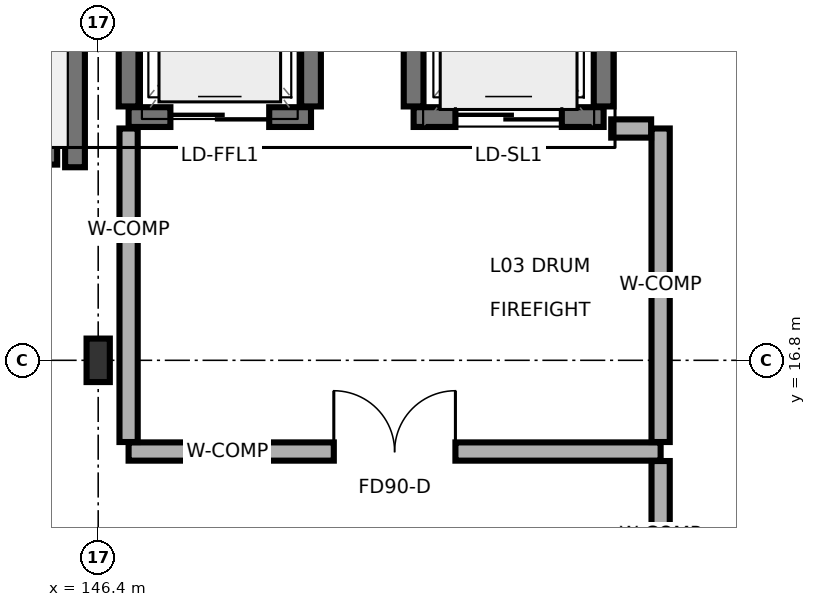
"""IFC4 building model, lengths in metres.
Left out: names, types, materials, properties, quantities, classifications, styles, units other than length and angle.
Written with IfcOpenShell. Run it as: python <this file> out.ifc"""

import sys

from ifc_helpers import new_model, si_unit, direction, frame, frame_2d, origin, origin_2d, place, context, subcontext, project, spatial, rectangle, i_section, extrude, element, fill, save


model = new_model("IFC4")
c1 = context("Model", 3, precision=1e-05, world=origin(), true_north=direction((0.0, 1.0)))
c2 = subcontext(c1, "Body", "Model", "MODEL_VIEW")
j1 = project(units=[si_unit("LENGTHUNIT", "METRE"), si_unit("PLANEANGLEUNIT", "RADIAN")], contexts=[c1])
p1 = place(None, origin())
s1 = spatial("IfcSite", under=j1, at=p1, CompositionType="ELEMENT")
p2 = place(p1, origin())
s2 = spatial("IfcBuilding", under=s1, at=p2, CompositionType="ELEMENT")
p3 = place(p2, frame((0.0, 0.0, 9.9)))
s3 = spatial("IfcBuildingStorey", under=s2, at=p3, CompositionType="ELEMENT", Elevation=9.9)
p4 = place(p3, frame((146.4, 16.8, 0.0), z_axis=(0.0, 0.0, 1.0), x_axis=(1.0, 0.0, 0.0)))
e1 = element("IfcColumn", 1, at=p4, inside=s3, PredefinedType="COLUMN", context=c2, shape_type="SweptSolid", body=[
    extrude(i_section(OverallWidth=0.306, OverallDepth=0.572, WebThickness=0.021, FlangeThickness=0.04, FilletRadius=0.027, at=origin_2d()), origin(), (0.0, 0.0, 1.0), 4.8),
])
p5 = place(p3, frame((146.095, 19.34, 0.0), z_axis=(0.0, 0.0, 1.0), x_axis=(0.0, 1.0, 0.0)))
e2 = element("IfcWall", 2, at=p5, inside=s3, PredefinedType="SHEAR", context=c2, shape_type="SweptSolid", body=[
    extrude(rectangle(XDim=4.27, YDim=0.26, at=frame_2d((2.135, 0.0))), origin(), (0.0, 0.0, 1.0), 3.535),
])
p6 = place(p3, frame((137.34, 19.505, 0.0), z_axis=(0.0, 0.0, 1.0), x_axis=(1.0, 0.0, 0.0)))
e3 = element("IfcWall", 3, at=p6, inside=s3, PredefinedType="SHEAR", context=c2, shape_type="SweptSolid", body=[
    extrude(rectangle(XDim=8.52, YDim=0.26, at=frame_2d((4.26, 0.0))), origin(), (0.0, 0.0, 1.0), 3.535),
])
p7 = place(p3, frame((146.8, 20.0, 0.0), z_axis=(0.0, 0.0, 1.0), x_axis=(1.0, 0.0, 0.0)))
e4 = element("IfcWall", 4, at=p7, inside=s3, PredefinedType="SHEAR", context=c2, shape_type="SweptSolid", body=[
    extrude(rectangle(XDim=2.4, YDim=0.26, at=frame_2d((1.2, 0.0))), origin(), (0.0, 0.0, 1.0), 4.54),
])
p8 = place(p7, frame((0.55, 0.0, 0.0)))
e5 = element("IfcOpeningElement", 5, at=p8, cuts=e4, PredefinedType="OPENING", context=c2, shape_type="SweptSolid", body=[
    extrude(rectangle(XDim=1.3, YDim=2.25, at=frame_2d((0.65, 1.125))), frame((0.0, 0.14, 0.0), z_axis=(0.0, -1.0, 0.0), x_axis=(1.0, 0.0, 0.0)), (0.0, 0.0, 1.0), 0.28),
])
for number, where, z_axis, x_axis in (
    (6, (146.8, 20.14, 0.0), (0.0, 0.0, 1.0), (0.0, 1.0, 0.0)),
    (7, (149.2, 20.14, 0.0), (0.0, 0.0, 1.0), (0.0, 1.0, 0.0)),
):
    element("IfcWall", number, at=place(p3, frame(where, z_axis=z_axis, x_axis=x_axis)), inside=s3, PredefinedType="SHEAR", context=c2, shape_type="SweptSolid", body=[
        extrude(rectangle(XDim=2.52, YDim=0.26, at=frame_2d((1.26, 0.0))), origin(), (0.0, 0.0, 1.0), 4.54),
    ])
p9 = place(p3, frame((150.55, 20.0, 0.0), z_axis=(0.0, 0.0, 1.0), x_axis=(1.0, 0.0, 0.0)))
e8 = element("IfcWall", 8, at=p9, inside=s3, PredefinedType="SHEAR", context=c2, shape_type="SweptSolid", body=[
    extrude(rectangle(XDim=2.5, YDim=0.26, at=frame_2d((1.25, 0.0))), origin(), (0.0, 0.0, 1.0), 4.54),
])
p10 = place(p9, frame((0.55, 0.0, 0.0)))
e9 = element("IfcOpeningElement", 9, at=p10, cuts=e8, PredefinedType="OPENING", context=c2, shape_type="SweptSolid", body=[
    extrude(rectangle(XDim=1.4, YDim=2.3, at=frame_2d((0.7, 1.15))), frame((0.0, 0.14, 0.0), z_axis=(0.0, -1.0, 0.0), x_axis=(1.0, 0.0, 0.0)), (0.0, 0.0, 1.0), 0.28),
])
for number, where, z_axis, x_axis in (
    (10, (150.55, 20.14, 0.0), (0.0, 0.0, 1.0), (0.0, 1.0, 0.0)),
    (11, (153.05, 20.14, 0.0), (0.0, 0.0, 1.0), (0.0, 1.0, 0.0)),
):
    element("IfcWall", number, at=place(p3, frame(where, z_axis=z_axis, x_axis=x_axis)), inside=s3, PredefinedType="SHEAR", context=c2, shape_type="SweptSolid", body=[
        extrude(rectangle(XDim=2.52, YDim=0.26, at=frame_2d((1.26, 0.0))), origin(), (0.0, 0.0, 1.0), 4.54),
    ])
p11 = place(p3, frame((146.8, 15.6, 0.0), z_axis=(0.0, 0.0, 1.0), x_axis=(1.0, 0.0, 0.0)))
e12 = element("IfcWall", 12, at=p11, inside=s3, PredefinedType="SOLIDWALL", context=c2, shape_type="SweptSolid", body=[
    extrude(rectangle(XDim=7.0, YDim=0.24, at=frame_2d((3.5, 0.0))), origin(), (0.0, 0.0, 1.0), 4.54),
])
p12 = place(p11, frame((2.7, 0.0, 0.0)))
e13 = element("IfcOpeningElement", 13, at=p12, cuts=e12, PredefinedType="OPENING", context=c2, shape_type="SweptSolid", body=[
    extrude(rectangle(XDim=1.6, YDim=2.2, at=frame_2d((0.8, 1.1))), frame((0.0, 0.13, 0.0), z_axis=(0.0, -1.0, 0.0), x_axis=(1.0, 0.0, 0.0)), (0.0, 0.0, 1.0), 0.26),
])
for number, where, z_axis, x_axis in (
    (14, (146.8, 15.725, 0.0), (0.0, 0.0, 1.0), (0.0, 1.0, 0.0)),
    (15, (153.8, 15.725, 0.0), (0.0, 0.0, 1.0), (0.0, 1.0, 0.0)),
):
    element("IfcWall", number, at=place(p3, frame(where, z_axis=z_axis, x_axis=x_axis)), inside=s3, PredefinedType="SOLIDWALL", context=c2, shape_type="SweptSolid", body=[
        extrude(rectangle(XDim=4.125, YDim=0.24, at=frame_2d((2.062, 0.0))), origin(), (0.0, 0.0, 1.0), 3.535),
    ])
p13 = place(p3, frame((153.15, 19.85, 0.0), z_axis=(0.0, 0.0, 1.0), x_axis=(1.0, 0.0, 0.0)))
e16 = element("IfcWall", 16, at=p13, inside=s3, PredefinedType="SOLIDWALL", context=c2, shape_type="SweptSolid", body=[
    extrude(rectangle(XDim=0.525, YDim=0.24, at=frame_2d((0.263, 0.0))), origin(), (0.0, 0.0, 1.0), 4.54),
])
p14 = place(p3, frame((153.8, 13.525, 0.0), z_axis=(0.0, 0.0, 1.0), x_axis=(0.0, 1.0, 0.0)))
e17 = element("IfcWall", 17, at=p14, inside=s3, PredefinedType="SOLIDWALL", context=c2, shape_type="SweptSolid", body=[
    extrude(rectangle(XDim=1.95, YDim=0.24, at=frame_2d((0.975, 0.0))), origin(), (0.0, 0.0, 1.0), 4.54),
])
p15 = place(p8, origin())
e18 = element("IfcDoor", 18, at=p15, inside=s3, OperationType="SLIDING_TO_RIGHT", PredefinedType="DOOR", context=c2, shape_type="SweptSolid", body=[
    extrude(rectangle(XDim=1.3, YDim=2.25, at=frame_2d((0.65, 1.125))), frame((0.0, 0.025, 0.0), z_axis=(0.0, -1.0, 0.0), x_axis=(1.0, 0.0, 0.0)), (0.0, 0.0, 1.0), 0.05),
])
fill(e5, e18)
p16 = place(p10, origin())
e19 = element("IfcDoor", 19, at=p16, inside=s3, OperationType="SLIDING_TO_LEFT", PredefinedType="DOOR", context=c2, shape_type="SweptSolid", body=[
    extrude(rectangle(XDim=1.4, YDim=2.3, at=frame_2d((0.7, 1.15))), frame((0.0, 0.025, 0.0), z_axis=(0.0, -1.0, 0.0), x_axis=(1.0, 0.0, 0.0)), (0.0, 0.0, 1.0), 0.05),
])
fill(e9, e19)
p17 = place(p12, origin())
e20 = element("IfcDoor", 20, at=p17, inside=s3, OperationType="DOUBLE_DOOR_SINGLE_SWING", PredefinedType="DOOR", context=c2, shape_type="SweptSolid", body=[
    extrude(rectangle(XDim=1.6, YDim=2.2, at=frame_2d((0.8, 1.1))), frame((0.0, 0.025, 0.0), z_axis=(0.0, -1.0, 0.0), x_axis=(1.0, 0.0, 0.0)), (0.0, 0.0, 1.0), 0.05),
])
fill(e13, e20)
save(model, sys.argv[1])
